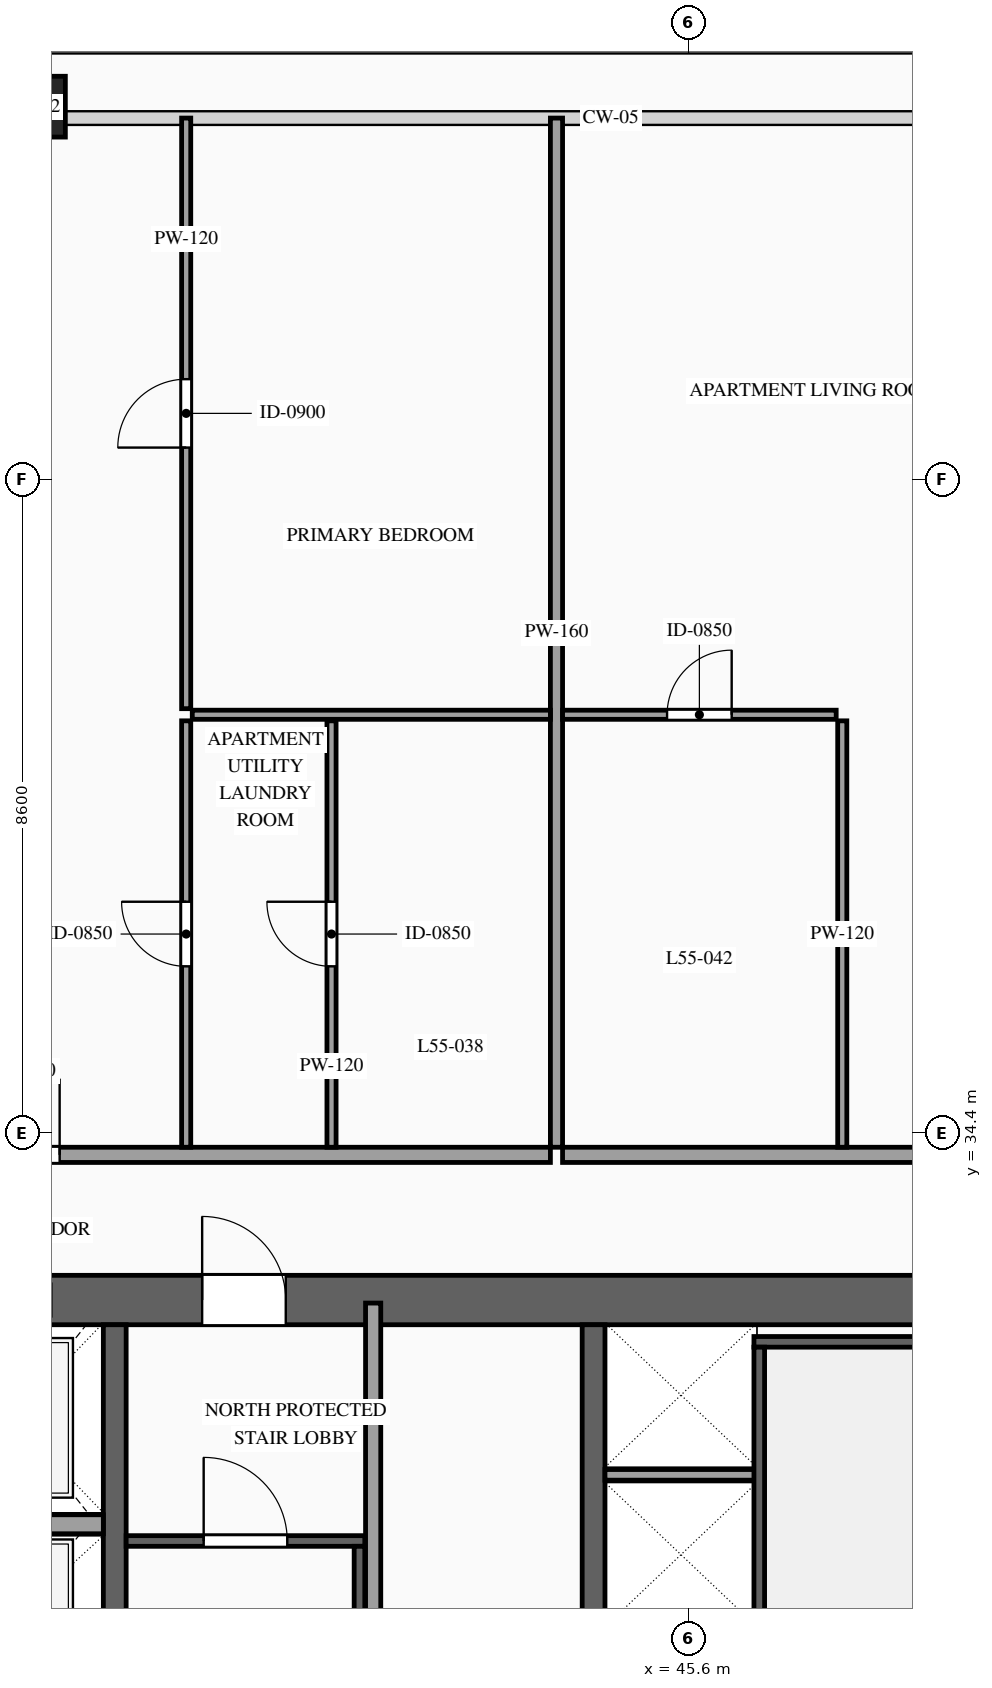
"""IFC4 building model, lengths in metres.
Left out: names, types, materials, properties, quantities, classifications, styles, units other than length and angle.
Written with IfcOpenShell. Run it as: python <this file> out.ifc"""

import sys

from ifc_helpers import new_model, si_unit, direction, frame, frame_2d, origin, origin_2d, place, context, subcontext, project, spatial, rectangle, hollow_rectangle, extrude, source, transform, mapped, element, fill, save


model = new_model("IFC4")
c1 = context("Model", 3, precision=1e-05, world=origin(), true_north=direction((0.0, 1.0)))
c2 = subcontext(c1, "Body", "Model", "MODEL_VIEW")
j1 = project(units=[si_unit("LENGTHUNIT", "METRE"), si_unit("PLANEANGLEUNIT", "RADIAN")], contexts=[c1])
p1 = place(None, origin())
s1 = spatial("IfcSite", under=j1, at=p1, CompositionType="ELEMENT")
p2 = place(p1, origin())
s2 = spatial("IfcBuilding", under=s1, at=p2, CompositionType="ELEMENT")
p3 = place(p2, frame((0.0, 0.0, 209.0)))
s3 = spatial("IfcBuildingStorey", under=s2, at=p3, CompositionType="ELEMENT", Elevation=209.0)
p4 = place(p3, frame((23.475, 32.2, 0.0), z_axis=(0.0, 0.0, 1.0), x_axis=(1.0, 0.0, 0.0)))
e1 = element("IfcWall", 1, at=p4, inside=s3, PredefinedType="SHEAR", context=c2, shape_type="SweptSolid", body=[
    extrude(rectangle(XDim=27.05, YDim=0.65, at=frame_2d((13.525, 0.0))), origin(), (0.0, 0.0, 1.0), 3.5),
])
p5 = place(p4, frame((4.595, 0.0, 0.0)))
e2 = element("IfcOpeningElement", 2, at=p5, cuts=e1, PredefinedType="OPENING", context=c2, shape_type="SweptSolid", body=[
    extrude(rectangle(XDim=0.9, YDim=2.15, at=frame_2d((0.45, 1.075))), frame((0.0, 0.34, 0.0), z_axis=(0.0, -1.0, 0.0), x_axis=(1.0, 0.0, 0.0)), (0.0, 0.0, 1.0), 0.68),
])
p6 = place(p4, frame((9.875, 0.0, 0.0)))
e3 = element("IfcOpeningElement", 3, at=p6, cuts=e1, PredefinedType="OPENING", context=c2, shape_type="SweptSolid", body=[
    extrude(rectangle(XDim=1.1, YDim=2.2, at=frame_2d((0.55, 1.1))), frame((0.0, 0.34, 0.0), z_axis=(0.0, -1.0, 0.0), x_axis=(1.0, 0.0, 0.0)), (0.0, 0.0, 1.0), 0.68),
])
p7 = place(p4, frame((15.725, 0.0, 0.0)))
e4 = element("IfcOpeningElement", 4, at=p7, cuts=e1, PredefinedType="OPENING", context=c2, shape_type="SweptSolid", body=[
    extrude(rectangle(XDim=1.1, YDim=2.2, at=frame_2d((0.55, 1.1))), frame((0.0, 0.34, 0.0), z_axis=(0.0, -1.0, 0.0), x_axis=(1.0, 0.0, 0.0)), (0.0, 0.0, 1.0), 0.68),
])
m1 = source(origin(), c2, "Body", "SweptSolid", [
    extrude(rectangle(XDim=12.15, YDim=0.3, at=frame_2d((6.075, 0.0))), origin(), (0.0, 0.0, 1.0), 3.5),
])
for number, where, z_axis, x_axis in (
    (5, (38.05, 19.725, 0.0), (0.0, 0.0, 1.0), (0.0, 1.0, 0.0)),
    (6, (44.35, 19.725, 0.0), (0.0, 0.0, 1.0), (0.0, 1.0, 0.0)),
):
    element("IfcWall", number, at=place(p3, frame(where, z_axis=z_axis, x_axis=x_axis)), inside=s3, PredefinedType="SOLIDWALL", context=c2, shape_type="MappedRepresentation", body=[
        mapped(m1, transform((0.0, 0.0, 0.0), scale=1.0)),
    ])
m2 = source(origin(), c2, "Body", "SweptSolid", [
    extrude(hollow_rectangle(XDim=0.8, YDim=0.8, WallThickness=0.036, at=origin_2d()), origin(), (0.0, 0.0, 1.0), 3.5),
])
p8 = place(p3, frame((37.0, 47.9, 0.0), z_axis=(0.0, 0.0, 1.0), x_axis=(1.0, 0.0, 0.0)))
e7 = element("IfcColumn", 7, at=p8, inside=s3, PredefinedType="COLUMN", context=c2, shape_type="MappedRepresentation", body=[
    mapped(m2, transform((0.0, 0.0, 0.0), scale=1.0)),
])
m3 = source(origin(), c2, "Body", "SweptSolid", [
    extrude(rectangle(XDim=2.4, YDim=0.25, at=frame_2d((1.2, 0.0))), origin(), (0.0, 0.0, 1.0), 3.28),
])
p9 = place(p3, frame((35.5, 29.25, 0.0), z_axis=(0.0, 0.0, 1.0), x_axis=(1.0, 0.0, 0.0)))
e8 = element("IfcWall", 8, at=p9, inside=s3, PredefinedType="SOLIDWALL", context=c2, shape_type="MappedRepresentation", body=[
    mapped(m3, transform((0.0, 0.0, 0.0), scale=1.0)),
])
m4 = source(origin(), c2, "Body", "SweptSolid", [
    extrude(rectangle(XDim=2.0, YDim=0.14, at=frame_2d((1.0, 0.0))), origin(), (0.0, 0.0, 1.0), 3.28),
])
p10 = place(p3, frame((44.5, 29.9, 0.0), z_axis=(0.0, 0.0, 1.0), x_axis=(1.0, 0.0, 0.0)))
e9 = element("IfcWall", 9, at=p10, inside=s3, PredefinedType="SOLIDWALL", context=c2, shape_type="MappedRepresentation", body=[
    mapped(m4, transform((0.0, 0.0, 0.0), scale=1.0)),
])
m5 = source(origin(), c2, "Body", "SweptSolid", [
    extrude(rectangle(XDim=3.28, YDim=0.14, at=frame_2d((1.64, 0.0))), origin(), (0.0, 0.0, 1.0), 3.28),
])
p11 = place(p3, frame((46.46, 31.65, 0.0), z_axis=(0.0, 0.0, 1.0), x_axis=(1.0, 0.0, 0.0)))
e10 = element("IfcWall", 10, at=p11, inside=s3, PredefinedType="SOLIDWALL", context=c2, shape_type="MappedRepresentation", body=[
    mapped(m5, transform((0.0, 0.0, 0.0), scale=1.0)),
])
m6 = source(origin(), c2, "Body", "SweptSolid", [
    extrude(rectangle(XDim=8.94, YDim=0.14, at=frame_2d((4.47, 0.0))), origin(), (0.0, 0.0, 1.0), 3.28),
])
p12 = place(p3, frame((46.53, 22.64, 0.0), z_axis=(0.0, 0.0, 1.0), x_axis=(0.0, 1.0, 0.0)))
e11 = element("IfcWall", 11, at=p12, inside=s3, PredefinedType="SOLIDWALL", context=c2, shape_type="MappedRepresentation", body=[
    mapped(m6, transform((0.0, 0.0, 0.0), scale=1.0)),
])
p13 = place(p3, frame((38.2, 29.03, 0.0), z_axis=(0.0, 0.0, 1.0), x_axis=(1.0, 0.0, 0.0)))
e12 = element("IfcWall", 12, at=p13, inside=s3, PredefinedType="SOLIDWALL", context=c2, shape_type="SweptSolid", body=[
    extrude(rectangle(XDim=3.14, YDim=0.14, at=frame_2d((1.57, 0.0))), origin(), (0.0, 0.0, 1.0), 3.28),
])
p14 = place(p13, frame((1.02, 0.0, 0.0)))
e13 = element("IfcOpeningElement", 13, at=p14, cuts=e12, PredefinedType="OPENING", context=c2, shape_type="SweptSolid", body=[
    extrude(rectangle(XDim=1.1, YDim=2.2, at=frame_2d((0.55, 1.1))), frame((0.0, 0.085, 0.0), z_axis=(0.0, -1.0, 0.0), x_axis=(1.0, 0.0, 0.0)), (0.0, 0.0, 1.0), 0.17),
])
m7 = source(origin(), c2, "Body", "SweptSolid", [
    extrude(rectangle(XDim=8.94, YDim=0.14, at=frame_2d((4.47, 0.0))), origin(), (0.0, 0.0, 1.0), 3.28),
])
p15 = place(p3, frame((41.27, 20.02, 0.0), z_axis=(0.0, 0.0, 1.0), x_axis=(0.0, 1.0, 0.0)))
e14 = element("IfcWall", 14, at=p15, inside=s3, PredefinedType="SOLIDWALL", context=c2, shape_type="MappedRepresentation", body=[
    mapped(m7, transform((0.0, 0.0, 0.0), scale=1.0)),
])
m8 = source(origin(), c2, "Body", "SweptSolid", [
    extrude(rectangle(XDim=12.72, YDim=0.2, at=frame_2d((6.36, 0.0))), origin(), (0.0, 0.0, 1.0), 3.28),
])
p16 = place(p3, frame((41.45, 19.44, 0.0), z_axis=(0.0, 0.0, 1.0), x_axis=(0.0, 1.0, 0.0)))
e15 = element("IfcWall", 15, at=p16, inside=s3, PredefinedType="PARTITIONING", context=c2, shape_type="MappedRepresentation", body=[
    mapped(m8, transform((0.0, 0.0, 0.0), scale=1.0)),
])
p17 = place(p3, frame((30.981, 34.11, 0.0), z_axis=(0.0, 0.0, 1.0), x_axis=(1.0, 0.0, 0.0)))
e16 = element("IfcWall", 16, at=p17, inside=s3, PredefinedType="PARTITIONING", context=c2, shape_type="SweptSolid", body=[
    extrude(rectangle(XDim=12.801, YDim=0.2, at=frame_2d((6.4, 0.0))), origin(), (0.0, 0.0, 1.0), 3.28),
])
p18 = place(p17, frame((5.344, 0.0, 0.0)))
e17 = element("IfcOpeningElement", 17, at=p18, cuts=e16, PredefinedType="OPENING", context=c2, shape_type="SweptSolid", body=[
    extrude(rectangle(XDim=1.0, YDim=2.2, at=frame_2d((0.5, 1.1))), frame((0.0, 0.115, 0.0), z_axis=(0.0, -1.0, 0.0), x_axis=(1.0, 0.0, 0.0)), (0.0, 0.0, 1.0), 0.23),
])
m9 = source(origin(), c2, "Body", "SweptSolid", [
    extrude(rectangle(XDim=13.54, YDim=0.16, at=frame_2d((6.77, 0.0))), origin(), (0.0, 0.0, 1.0), 3.28),
])
p19 = place(p3, frame((43.862, 34.21, 0.0), z_axis=(0.0, 0.0, 1.0), x_axis=(0.0, 1.0, 0.0)))
e18 = element("IfcWall", 18, at=p19, inside=s3, PredefinedType="PARTITIONING", context=c2, shape_type="MappedRepresentation", body=[
    mapped(m9, transform((0.0, 0.0, 0.0), scale=1.0)),
])
p20 = place(p3, frame((40.902, 34.21, 0.0), z_axis=(0.0, 0.0, 1.0), x_axis=(0.0, 1.0, 0.0)))
e19 = element("IfcWall", 19, at=p20, inside=s3, PredefinedType="PARTITIONING", context=c2, shape_type="SweptSolid", body=[
    extrude(rectangle(XDim=5.61, YDim=0.12, at=frame_2d((2.805, 0.0))), origin(), (0.0, 0.0, 1.0), 3.28),
])
p21 = place(p20, frame((2.38, 0.0, 0.0)))
e20 = element("IfcOpeningElement", 20, at=p21, cuts=e19, PredefinedType="OPENING", context=c2, shape_type="SweptSolid", body=[
    extrude(rectangle(XDim=0.85, YDim=2.1, at=frame_2d((0.425, 1.05))), frame((0.0, 0.075, 0.0), z_axis=(0.0, -1.0, 0.0), x_axis=(1.0, 0.0, 0.0)), (0.0, 0.0, 1.0), 0.15),
])
m10 = source(origin(), c2, "Body", "SweptSolid", [
    extrude(rectangle(XDim=4.712, YDim=0.12, at=frame_2d((2.356, 0.0))), origin(), (0.0, 0.0, 1.0), 2.875),
])
p22 = place(p3, frame((39.07, 39.9, 0.0), z_axis=(0.0, 0.0, 1.0), x_axis=(1.0, 0.0, 0.0)))
e21 = element("IfcWall", 21, at=p22, inside=s3, PredefinedType="PARTITIONING", context=c2, shape_type="MappedRepresentation", body=[
    mapped(m10, transform((0.0, 0.0, 0.0), scale=1.0)),
])
p23 = place(p3, frame((38.99, 39.98, 0.0), z_axis=(0.0, 0.0, 1.0), x_axis=(0.0, 1.0, 0.0)))
e22 = element("IfcWall", 22, at=p23, inside=s3, PredefinedType="PARTITIONING", context=c2, shape_type="SweptSolid", body=[
    extrude(rectangle(XDim=7.77, YDim=0.12, at=frame_2d((3.885, 0.0))), origin(), (0.0, 0.0, 1.0), 3.28),
])
p24 = place(p23, frame((3.435, 0.0, 0.0)))
e23 = element("IfcOpeningElement", 23, at=p24, cuts=e22, PredefinedType="OPENING", context=c2, shape_type="SweptSolid", body=[
    extrude(rectangle(XDim=0.9, YDim=2.15, at=frame_2d((0.45, 1.075))), frame((0.0, 0.075, 0.0), z_axis=(0.0, -1.0, 0.0), x_axis=(1.0, 0.0, 0.0)), (0.0, 0.0, 1.0), 0.15),
])
p25 = place(p3, frame((38.99, 34.21, 0.0), z_axis=(0.0, 0.0, 1.0), x_axis=(0.0, 1.0, 0.0)))
e24 = element("IfcWall", 24, at=p25, inside=s3, PredefinedType="PARTITIONING", context=c2, shape_type="SweptSolid", body=[
    extrude(rectangle(XDim=5.61, YDim=0.12, at=frame_2d((2.805, 0.0))), origin(), (0.0, 0.0, 1.0), 3.28),
])
p26 = place(p25, frame((2.38, 0.0, 0.0)))
e25 = element("IfcOpeningElement", 25, at=p26, cuts=e24, PredefinedType="OPENING", context=c2, shape_type="SweptSolid", body=[
    extrude(rectangle(XDim=0.85, YDim=2.1, at=frame_2d((0.425, 1.05))), frame((0.0, 0.075, 0.0), z_axis=(0.0, -1.0, 0.0), x_axis=(1.0, 0.0, 0.0)), (0.0, 0.0, 1.0), 0.15),
])
p27 = place(p3, frame((43.942, 34.11, 0.0), z_axis=(0.0, 0.0, 1.0), x_axis=(1.0, 0.0, 0.0)))
e26 = element("IfcWall", 26, at=p27, inside=s3, PredefinedType="PARTITIONING", context=c2, shape_type="SweptSolid", body=[
    extrude(rectangle(XDim=12.118, YDim=0.2, at=frame_2d((6.059, 0.0))), origin(), (0.0, 0.0, 1.0), 3.28),
])
p28 = place(p27, frame((5.003, 0.0, 0.0)))
e27 = element("IfcOpeningElement", 27, at=p28, cuts=e26, PredefinedType="OPENING", context=c2, shape_type="SweptSolid", body=[
    extrude(rectangle(XDim=1.0, YDim=2.2, at=frame_2d((0.5, 1.1))), frame((0.0, 0.115, 0.0), z_axis=(0.0, -1.0, 0.0), x_axis=(1.0, 0.0, 0.0)), (0.0, 0.0, 1.0), 0.23),
])
p29 = place(p3, frame((43.942, 39.9, 0.0), z_axis=(0.0, 0.0, 1.0), x_axis=(1.0, 0.0, 0.0)))
e28 = element("IfcWall", 28, at=p29, inside=s3, PredefinedType="PARTITIONING", context=c2, shape_type="SweptSolid", body=[
    extrude(rectangle(XDim=3.6, YDim=0.12, at=frame_2d((1.8, 0.0))), origin(), (0.0, 0.0, 1.0), 2.875),
])
p30 = place(p29, frame((1.375, 0.0, 0.0)))
e29 = element("IfcOpeningElement", 29, at=p30, cuts=e28, PredefinedType="OPENING", context=c2, shape_type="SweptSolid", body=[
    extrude(rectangle(XDim=0.85, YDim=2.1, at=frame_2d((0.425, 1.05))), frame((0.0, 0.075, 0.0), z_axis=(0.0, -1.0, 0.0), x_axis=(1.0, 0.0, 0.0)), (0.0, 0.0, 1.0), 0.15),
])
m11 = source(origin(), c2, "Body", "SweptSolid", [
    extrude(rectangle(XDim=5.61, YDim=0.12, at=frame_2d((2.805, 0.0))), origin(), (0.0, 0.0, 1.0), 3.28),
])
p31 = place(p3, frame((47.622, 34.21, 0.0), z_axis=(0.0, 0.0, 1.0), x_axis=(0.0, 1.0, 0.0)))
e30 = element("IfcWall", 30, at=p31, inside=s3, PredefinedType="PARTITIONING", context=c2, shape_type="MappedRepresentation", body=[
    mapped(m11, transform((0.0, 0.0, 0.0), scale=1.0)),
])
m12 = source(origin(), c2, "Body", "SweptSolid", [
    extrude(rectangle(XDim=1.1, YDim=2.2, at=frame_2d((0.55, 1.1))), frame((0.0, 0.025, 0.0), z_axis=(0.0, -1.0, 0.0), x_axis=(1.0, 0.0, 0.0)), (0.0, 0.0, 1.0), 0.05),
])
p32 = place(p14, origin())
e31 = element("IfcDoor", 31, at=p32, inside=s3, OperationType="SINGLE_SWING_LEFT", PredefinedType="DOOR", context=c2, shape_type="MappedRepresentation", body=[
    mapped(m12, transform((0.0, 0.0, 0.0), scale=1.0)),
])
fill(e13, e31)
p33 = place(p7, origin())
e32 = element("IfcDoor", 32, at=p33, inside=s3, OperationType="SINGLE_SWING_LEFT", PredefinedType="DOOR", context=c2, shape_type="MappedRepresentation", body=[
    mapped(m12, transform((0.0, 0.0, 0.0), scale=1.0)),
])
fill(e4, e32)
m13 = source(origin(), c2, "Body", "SweptSolid", [
    extrude(rectangle(XDim=1.0, YDim=2.2, at=frame_2d((0.5, 1.1))), frame((0.0, 0.025, 0.0), z_axis=(0.0, -1.0, 0.0), x_axis=(1.0, 0.0, 0.0)), (0.0, 0.0, 1.0), 0.05),
])
p34 = place(p18, origin())
e33 = element("IfcDoor", 33, at=p34, inside=s3, OperationType="SINGLE_SWING_RIGHT", PredefinedType="DOOR", context=c2, shape_type="MappedRepresentation", body=[
    mapped(m13, transform((0.0, 0.0, 0.0), scale=1.0)),
])
fill(e17, e33)
m14 = source(origin(), c2, "Body", "SweptSolid", [
    extrude(rectangle(XDim=0.85, YDim=2.1, at=frame_2d((0.425, 1.05))), frame((0.0, 0.025, 0.0), z_axis=(0.0, -1.0, 0.0), x_axis=(1.0, 0.0, 0.0)), (0.0, 0.0, 1.0), 0.05),
])
p35 = place(p21, origin())
e34 = element("IfcDoor", 34, at=p35, inside=s3, OperationType="SINGLE_SWING_RIGHT", PredefinedType="DOOR", context=c2, shape_type="MappedRepresentation", body=[
    mapped(m14, transform((0.0, 0.0, 0.0), scale=1.0)),
])
fill(e20, e34)
m15 = source(origin(), c2, "Body", "SweptSolid", [
    extrude(rectangle(XDim=0.9, YDim=2.15, at=frame_2d((0.45, 1.075))), frame((0.0, 0.025, 0.0), z_axis=(0.0, -1.0, 0.0), x_axis=(1.0, 0.0, 0.0)), (0.0, 0.0, 1.0), 0.05),
])
p36 = place(p24, origin())
e35 = element("IfcDoor", 35, at=p36, inside=s3, OperationType="SINGLE_SWING_LEFT", PredefinedType="DOOR", context=c2, shape_type="MappedRepresentation", body=[
    mapped(m15, transform((0.0, 0.0, 0.0), scale=1.0)),
])
fill(e23, e35)
p37 = place(p26, origin())
e36 = element("IfcDoor", 36, at=p37, inside=s3, OperationType="SINGLE_SWING_RIGHT", PredefinedType="DOOR", context=c2, shape_type="MappedRepresentation", body=[
    mapped(m14, transform((0.0, 0.0, 0.0), scale=1.0)),
])
fill(e25, e36)
p38 = place(p30, origin())
e37 = element("IfcDoor", 37, at=p38, inside=s3, OperationType="SINGLE_SWING_RIGHT", PredefinedType="DOOR", context=c2, shape_type="MappedRepresentation", body=[
    mapped(m14, transform((0.0, 0.0, 0.0), scale=1.0)),
])
fill(e29, e37)
save(model, sys.argv[1])
